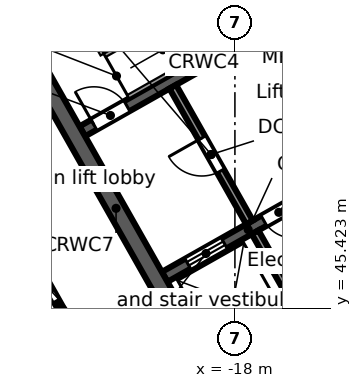
"""IFC4 building model, lengths in metres.
Left out: names, types, materials, properties, quantities, classifications, styles, units other than length and angle.
Written with IfcOpenShell. Run it as: python <this file> out.ifc"""

import sys

from ifc_helpers import new_model, si_unit, direction, frame, frame_2d, origin, place, context, subcontext, project, spatial, rectangle, extrude, element, fill, save


model = new_model("IFC4")
c1 = context("Model", 3, precision=1e-05, world=origin(), true_north=direction((0.0, 1.0)))
c2 = subcontext(c1, "Body", "Model", "MODEL_VIEW")
j1 = project(units=[si_unit("LENGTHUNIT", "METRE"), si_unit("PLANEANGLEUNIT", "RADIAN")], contexts=[c1])
p1 = place(None, origin())
s1 = spatial("IfcSite", under=j1, at=p1, CompositionType="ELEMENT")
p2 = place(p1, origin())
s2 = spatial("IfcBuilding", under=s1, at=p2, CompositionType="ELEMENT")
p3 = place(p2, frame((0.0, 0.0, 211.4)))
s3 = spatial("IfcBuildingStorey", under=s2, at=p3, CompositionType="ELEMENT", Elevation=211.4)
p4 = place(p3, frame((-0.046, 47.974, 0.0), z_axis=(0.0, 0.0, 1.0), x_axis=(-0.870356579543, -0.492421998337, 0.0)))
e1 = element("IfcWall", 1, at=p4, inside=s3, PredefinedType="STANDARD", context=c2, shape_type="SweptSolid", body=[
    extrude(rectangle(XDim=43.754, YDim=0.25, at=frame_2d((21.877, 0.0))), origin(), (0.0, 0.0, 1.0), 3.62),
])
p5 = place(p4, frame((41.061, 0.0, 0.8)))
e2 = element("IfcOpeningElement", 2, at=p5, cuts=e1, PredefinedType="OPENING", context=c2, shape_type="SweptSolid", body=[
    extrude(rectangle(XDim=2.4, YDim=2.2, at=frame_2d((1.2, 1.1))), frame((0.0, 0.135, 0.0), z_axis=(0.0, -1.0, 0.0), x_axis=(1.0, 0.0, 0.0)), (0.0, 0.0, 1.0), 0.27),
])
p6 = place(p4, frame((38.443, 0.0, 0.0)))
e3 = element("IfcOpeningElement", 3, at=p6, cuts=e1, PredefinedType="OPENING", context=c2, shape_type="SweptSolid", body=[
    extrude(rectangle(XDim=1.8, YDim=2.4, at=frame_2d((0.9, 1.2))), frame((0.0, 0.135, 0.0), z_axis=(0.0, -1.0, 0.0), x_axis=(1.0, 0.0, 0.0)), (0.0, 0.0, 1.0), 0.27),
])
p7 = place(p4, frame((35.225, 0.0, 0.8)))
e4 = element("IfcOpeningElement", 4, at=p7, cuts=e1, PredefinedType="OPENING", context=c2, shape_type="SweptSolid", body=[
    extrude(rectangle(XDim=2.4, YDim=2.2, at=frame_2d((1.2, 1.1))), frame((0.0, 0.135, 0.0), z_axis=(0.0, -1.0, 0.0), x_axis=(1.0, 0.0, 0.0)), (0.0, 0.0, 1.0), 0.27),
])
p8 = place(p4, frame((32.307, 0.0, 0.8)))
e5 = element("IfcOpeningElement", 5, at=p8, cuts=e1, PredefinedType="OPENING", context=c2, shape_type="SweptSolid", body=[
    extrude(rectangle(XDim=2.4, YDim=2.2, at=frame_2d((1.2, 1.1))), frame((0.0, 0.135, 0.0), z_axis=(0.0, -1.0, 0.0), x_axis=(1.0, 0.0, 0.0)), (0.0, 0.0, 1.0), 0.27),
])
p9 = place(p4, frame((29.688, 0.0, 0.0)))
e6 = element("IfcOpeningElement", 6, at=p9, cuts=e1, PredefinedType="OPENING", context=c2, shape_type="SweptSolid", body=[
    extrude(rectangle(XDim=1.8, YDim=2.4, at=frame_2d((0.9, 1.2))), frame((0.0, 0.135, 0.0), z_axis=(0.0, -1.0, 0.0), x_axis=(1.0, 0.0, 0.0)), (0.0, 0.0, 1.0), 0.27),
])
p10 = place(p4, frame((26.47, 0.0, 0.8)))
e7 = element("IfcOpeningElement", 7, at=p10, cuts=e1, PredefinedType="OPENING", context=c2, shape_type="SweptSolid", body=[
    extrude(rectangle(XDim=2.4, YDim=2.2, at=frame_2d((1.2, 1.1))), frame((0.0, 0.135, 0.0), z_axis=(0.0, -1.0, 0.0), x_axis=(1.0, 0.0, 0.0)), (0.0, 0.0, 1.0), 0.27),
])
p11 = place(p4, frame((23.552, 0.0, 0.8)))
e8 = element("IfcOpeningElement", 8, at=p11, cuts=e1, PredefinedType="OPENING", context=c2, shape_type="SweptSolid", body=[
    extrude(rectangle(XDim=2.4, YDim=2.2, at=frame_2d((1.2, 1.1))), frame((0.0, 0.135, 0.0), z_axis=(0.0, -1.0, 0.0), x_axis=(1.0, 0.0, 0.0)), (0.0, 0.0, 1.0), 0.27),
])
p12 = place(p4, frame((20.934, 0.0, 0.0)))
e9 = element("IfcOpeningElement", 9, at=p12, cuts=e1, PredefinedType="OPENING", context=c2, shape_type="SweptSolid", body=[
    extrude(rectangle(XDim=1.8, YDim=2.4, at=frame_2d((0.9, 1.2))), frame((0.0, 0.135, 0.0), z_axis=(0.0, -1.0, 0.0), x_axis=(1.0, 0.0, 0.0)), (0.0, 0.0, 1.0), 0.27),
])
p13 = place(p4, frame((17.716, 0.0, 0.8)))
e10 = element("IfcOpeningElement", 10, at=p13, cuts=e1, PredefinedType="OPENING", context=c2, shape_type="SweptSolid", body=[
    extrude(rectangle(XDim=2.4, YDim=2.2, at=frame_2d((1.2, 1.1))), frame((0.0, 0.135, 0.0), z_axis=(0.0, -1.0, 0.0), x_axis=(1.0, 0.0, 0.0)), (0.0, 0.0, 1.0), 0.27),
])
p14 = place(p4, frame((14.798, 0.0, 0.8)))
e11 = element("IfcOpeningElement", 11, at=p14, cuts=e1, PredefinedType="OPENING", context=c2, shape_type="SweptSolid", body=[
    extrude(rectangle(XDim=2.4, YDim=2.2, at=frame_2d((1.2, 1.1))), frame((0.0, 0.135, 0.0), z_axis=(0.0, -1.0, 0.0), x_axis=(1.0, 0.0, 0.0)), (0.0, 0.0, 1.0), 0.27),
])
p15 = place(p4, frame((12.179, 0.0, 0.0)))
e12 = element("IfcOpeningElement", 12, at=p15, cuts=e1, PredefinedType="OPENING", context=c2, shape_type="SweptSolid", body=[
    extrude(rectangle(XDim=1.8, YDim=2.4, at=frame_2d((0.9, 1.2))), frame((0.0, 0.135, 0.0), z_axis=(0.0, -1.0, 0.0), x_axis=(1.0, 0.0, 0.0)), (0.0, 0.0, 1.0), 0.27),
])
p16 = place(p4, frame((8.961, 0.0, 0.8)))
e13 = element("IfcOpeningElement", 13, at=p16, cuts=e1, PredefinedType="OPENING", context=c2, shape_type="SweptSolid", body=[
    extrude(rectangle(XDim=2.4, YDim=2.2, at=frame_2d((1.2, 1.1))), frame((0.0, 0.135, 0.0), z_axis=(0.0, -1.0, 0.0), x_axis=(1.0, 0.0, 0.0)), (0.0, 0.0, 1.0), 0.27),
])
p17 = place(p4, frame((6.043, 0.0, 0.8)))
e14 = element("IfcOpeningElement", 14, at=p17, cuts=e1, PredefinedType="OPENING", context=c2, shape_type="SweptSolid", body=[
    extrude(rectangle(XDim=2.4, YDim=2.2, at=frame_2d((1.2, 1.1))), frame((0.0, 0.135, 0.0), z_axis=(0.0, -1.0, 0.0), x_axis=(1.0, 0.0, 0.0)), (0.0, 0.0, 1.0), 0.27),
])
p18 = place(p4, frame((3.425, 0.0, 0.0)))
e15 = element("IfcOpeningElement", 15, at=p18, cuts=e1, PredefinedType="OPENING", context=c2, shape_type="SweptSolid", body=[
    extrude(rectangle(XDim=1.8, YDim=2.4, at=frame_2d((0.9, 1.2))), frame((0.0, 0.135, 0.0), z_axis=(0.0, -1.0, 0.0), x_axis=(1.0, 0.0, 0.0)), (0.0, 0.0, 1.0), 0.27),
])
p19 = place(p4, frame((0.207, 0.0, 0.8)))
e16 = element("IfcOpeningElement", 16, at=p19, cuts=e1, PredefinedType="OPENING", context=c2, shape_type="SweptSolid", body=[
    extrude(rectangle(XDim=2.4, YDim=2.2, at=frame_2d((1.2, 1.1))), frame((0.0, 0.135, 0.0), z_axis=(0.0, -1.0, 0.0), x_axis=(1.0, 0.0, 0.0)), (0.0, 0.0, 1.0), 0.27),
])
p20 = place(p3, frame((-58.732, 38.771, 0.0), z_axis=(0.0, 0.0, 1.0), x_axis=(0.870354824205, 0.492425100887, 0.0)))
e17 = element("IfcWall", 17, at=p20, inside=s3, PredefinedType="STANDARD", context=c2, shape_type="SweptSolid", body=[
    extrude(rectangle(XDim=64.006, YDim=0.25, at=frame_2d((32.003, 0.0))), origin(), (0.0, 0.0, 1.0), 3.62),
])
p21 = place(p20, frame((61.259, 0.0, 0.8)))
e18 = element("IfcOpeningElement", 18, at=p21, cuts=e17, PredefinedType="OPENING", context=c2, shape_type="SweptSolid", body=[
    extrude(rectangle(XDim=2.4, YDim=2.2, at=frame_2d((1.2, 1.1))), frame((0.0, 0.135, 0.0), z_axis=(0.0, -1.0, 0.0), x_axis=(1.0, 0.0, 0.0)), (0.0, 0.0, 1.0), 0.27),
])
p22 = place(p20, frame((58.216, 0.0, 0.8)))
e19 = element("IfcOpeningElement", 19, at=p22, cuts=e17, PredefinedType="OPENING", context=c2, shape_type="SweptSolid", body=[
    extrude(rectangle(XDim=2.4, YDim=2.2, at=frame_2d((1.2, 1.1))), frame((0.0, 0.135, 0.0), z_axis=(0.0, -1.0, 0.0), x_axis=(1.0, 0.0, 0.0)), (0.0, 0.0, 1.0), 0.27),
])
p23 = place(p20, frame((55.173, 0.0, 0.8)))
e20 = element("IfcOpeningElement", 20, at=p23, cuts=e17, PredefinedType="OPENING", context=c2, shape_type="SweptSolid", body=[
    extrude(rectangle(XDim=2.4, YDim=2.2, at=frame_2d((1.2, 1.1))), frame((0.0, 0.135, 0.0), z_axis=(0.0, -1.0, 0.0), x_axis=(1.0, 0.0, 0.0)), (0.0, 0.0, 1.0), 0.27),
])
p24 = place(p20, frame((52.129, 0.0, 0.8)))
e21 = element("IfcOpeningElement", 21, at=p24, cuts=e17, PredefinedType="OPENING", context=c2, shape_type="SweptSolid", body=[
    extrude(rectangle(XDim=2.4, YDim=2.2, at=frame_2d((1.2, 1.1))), frame((0.0, 0.135, 0.0), z_axis=(0.0, -1.0, 0.0), x_axis=(1.0, 0.0, 0.0)), (0.0, 0.0, 1.0), 0.27),
])
p25 = place(p20, frame((49.086, 0.0, 0.8)))
e22 = element("IfcOpeningElement", 22, at=p25, cuts=e17, PredefinedType="OPENING", context=c2, shape_type="SweptSolid", body=[
    extrude(rectangle(XDim=2.4, YDim=2.2, at=frame_2d((1.2, 1.1))), frame((0.0, 0.135, 0.0), z_axis=(0.0, -1.0, 0.0), x_axis=(1.0, 0.0, 0.0)), (0.0, 0.0, 1.0), 0.27),
])
p26 = place(p20, frame((46.043, 0.0, 0.8)))
e23 = element("IfcOpeningElement", 23, at=p26, cuts=e17, PredefinedType="OPENING", context=c2, shape_type="SweptSolid", body=[
    extrude(rectangle(XDim=2.4, YDim=2.2, at=frame_2d((1.2, 1.1))), frame((0.0, 0.135, 0.0), z_axis=(0.0, -1.0, 0.0), x_axis=(1.0, 0.0, 0.0)), (0.0, 0.0, 1.0), 0.27),
])
p27 = place(p20, frame((43.0, 0.0, 0.8)))
e24 = element("IfcOpeningElement", 24, at=p27, cuts=e17, PredefinedType="OPENING", context=c2, shape_type="SweptSolid", body=[
    extrude(rectangle(XDim=2.4, YDim=2.2, at=frame_2d((1.2, 1.1))), frame((0.0, 0.135, 0.0), z_axis=(0.0, -1.0, 0.0), x_axis=(1.0, 0.0, 0.0)), (0.0, 0.0, 1.0), 0.27),
])
p28 = place(p20, frame((39.956, 0.0, 0.8)))
e25 = element("IfcOpeningElement", 25, at=p28, cuts=e17, PredefinedType="OPENING", context=c2, shape_type="SweptSolid", body=[
    extrude(rectangle(XDim=2.4, YDim=2.2, at=frame_2d((1.2, 1.1))), frame((0.0, 0.135, 0.0), z_axis=(0.0, -1.0, 0.0), x_axis=(1.0, 0.0, 0.0)), (0.0, 0.0, 1.0), 0.27),
])
p29 = place(p20, frame((36.913, 0.0, 0.8)))
e26 = element("IfcOpeningElement", 26, at=p29, cuts=e17, PredefinedType="OPENING", context=c2, shape_type="SweptSolid", body=[
    extrude(rectangle(XDim=2.4, YDim=2.2, at=frame_2d((1.2, 1.1))), frame((0.0, 0.135, 0.0), z_axis=(0.0, -1.0, 0.0), x_axis=(1.0, 0.0, 0.0)), (0.0, 0.0, 1.0), 0.27),
])
p30 = place(p20, frame((33.87, 0.0, 0.8)))
e27 = element("IfcOpeningElement", 27, at=p30, cuts=e17, PredefinedType="OPENING", context=c2, shape_type="SweptSolid", body=[
    extrude(rectangle(XDim=2.4, YDim=2.2, at=frame_2d((1.2, 1.1))), frame((0.0, 0.135, 0.0), z_axis=(0.0, -1.0, 0.0), x_axis=(1.0, 0.0, 0.0)), (0.0, 0.0, 1.0), 0.27),
])
p31 = place(p20, frame((30.826, 0.0, 0.8)))
e28 = element("IfcOpeningElement", 28, at=p31, cuts=e17, PredefinedType="OPENING", context=c2, shape_type="SweptSolid", body=[
    extrude(rectangle(XDim=2.4, YDim=2.2, at=frame_2d((1.2, 1.1))), frame((0.0, 0.135, 0.0), z_axis=(0.0, -1.0, 0.0), x_axis=(1.0, 0.0, 0.0)), (0.0, 0.0, 1.0), 0.27),
])
p32 = place(p20, frame((27.783, 0.0, 0.8)))
e29 = element("IfcOpeningElement", 29, at=p32, cuts=e17, PredefinedType="OPENING", context=c2, shape_type="SweptSolid", body=[
    extrude(rectangle(XDim=2.4, YDim=2.2, at=frame_2d((1.2, 1.1))), frame((0.0, 0.135, 0.0), z_axis=(0.0, -1.0, 0.0), x_axis=(1.0, 0.0, 0.0)), (0.0, 0.0, 1.0), 0.27),
])
p33 = place(p20, frame((24.74, 0.0, 0.8)))
e30 = element("IfcOpeningElement", 30, at=p33, cuts=e17, PredefinedType="OPENING", context=c2, shape_type="SweptSolid", body=[
    extrude(rectangle(XDim=2.4, YDim=2.2, at=frame_2d((1.2, 1.1))), frame((0.0, 0.135, 0.0), z_axis=(0.0, -1.0, 0.0), x_axis=(1.0, 0.0, 0.0)), (0.0, 0.0, 1.0), 0.27),
])
p34 = place(p20, frame((21.696, 0.0, 0.8)))
e31 = element("IfcOpeningElement", 31, at=p34, cuts=e17, PredefinedType="OPENING", context=c2, shape_type="SweptSolid", body=[
    extrude(rectangle(XDim=2.4, YDim=2.2, at=frame_2d((1.2, 1.1))), frame((0.0, 0.135, 0.0), z_axis=(0.0, -1.0, 0.0), x_axis=(1.0, 0.0, 0.0)), (0.0, 0.0, 1.0), 0.27),
])
p35 = place(p20, frame((18.653, 0.0, 0.8)))
e32 = element("IfcOpeningElement", 32, at=p35, cuts=e17, PredefinedType="OPENING", context=c2, shape_type="SweptSolid", body=[
    extrude(rectangle(XDim=2.4, YDim=2.2, at=frame_2d((1.2, 1.1))), frame((0.0, 0.135, 0.0), z_axis=(0.0, -1.0, 0.0), x_axis=(1.0, 0.0, 0.0)), (0.0, 0.0, 1.0), 0.27),
])
p36 = place(p20, frame((15.61, 0.0, 0.8)))
e33 = element("IfcOpeningElement", 33, at=p36, cuts=e17, PredefinedType="OPENING", context=c2, shape_type="SweptSolid", body=[
    extrude(rectangle(XDim=2.4, YDim=2.2, at=frame_2d((1.2, 1.1))), frame((0.0, 0.135, 0.0), z_axis=(0.0, -1.0, 0.0), x_axis=(1.0, 0.0, 0.0)), (0.0, 0.0, 1.0), 0.27),
])
p37 = place(p20, frame((12.567, 0.0, 0.8)))
e34 = element("IfcOpeningElement", 34, at=p37, cuts=e17, PredefinedType="OPENING", context=c2, shape_type="SweptSolid", body=[
    extrude(rectangle(XDim=2.4, YDim=2.2, at=frame_2d((1.2, 1.1))), frame((0.0, 0.135, 0.0), z_axis=(0.0, -1.0, 0.0), x_axis=(1.0, 0.0, 0.0)), (0.0, 0.0, 1.0), 0.27),
])
p38 = place(p20, frame((9.523, 0.0, 0.8)))
e35 = element("IfcOpeningElement", 35, at=p38, cuts=e17, PredefinedType="OPENING", context=c2, shape_type="SweptSolid", body=[
    extrude(rectangle(XDim=2.4, YDim=2.2, at=frame_2d((1.2, 1.1))), frame((0.0, 0.135, 0.0), z_axis=(0.0, -1.0, 0.0), x_axis=(1.0, 0.0, 0.0)), (0.0, 0.0, 1.0), 0.27),
])
p39 = place(p20, frame((6.48, 0.0, 0.8)))
e36 = element("IfcOpeningElement", 36, at=p39, cuts=e17, PredefinedType="OPENING", context=c2, shape_type="SweptSolid", body=[
    extrude(rectangle(XDim=2.4, YDim=2.2, at=frame_2d((1.2, 1.1))), frame((0.0, 0.135, 0.0), z_axis=(0.0, -1.0, 0.0), x_axis=(1.0, 0.0, 0.0)), (0.0, 0.0, 1.0), 0.27),
])
p40 = place(p20, frame((3.437, 0.0, 0.8)))
e37 = element("IfcOpeningElement", 37, at=p40, cuts=e17, PredefinedType="OPENING", context=c2, shape_type="SweptSolid", body=[
    extrude(rectangle(XDim=2.4, YDim=2.2, at=frame_2d((1.2, 1.1))), frame((0.0, 0.135, 0.0), z_axis=(0.0, -1.0, 0.0), x_axis=(1.0, 0.0, 0.0)), (0.0, 0.0, 1.0), 0.27),
])
p41 = place(p20, frame((0.393, 0.0, 0.8)))
e38 = element("IfcOpeningElement", 38, at=p41, cuts=e17, PredefinedType="OPENING", context=c2, shape_type="SweptSolid", body=[
    extrude(rectangle(XDim=2.4, YDim=2.2, at=frame_2d((1.2, 1.1))), frame((0.0, 0.135, 0.0), z_axis=(0.0, -1.0, 0.0), x_axis=(1.0, 0.0, 0.0)), (0.0, 0.0, 1.0), 0.27),
])
p42 = place(p3, frame((-17.988, 42.039, 0.0), z_axis=(0.0, 0.0, 1.0), x_axis=(0.870360574057, 0.492414937962, 0.0)))
e39 = element("IfcWall", 39, at=p42, inside=s3, PredefinedType="SOLIDWALL", context=c2, shape_type="SweptSolid", body=[
    extrude(rectangle(XDim=15.0, YDim=0.45, at=frame_2d((7.5, 0.0))), origin(), (0.0, 0.0, 1.0), 3.62),
])
p43 = place(p42, frame((6.1, 0.0, 0.0)))
e40 = element("IfcOpeningElement", 40, at=p43, cuts=e39, PredefinedType="OPENING", context=c2, shape_type="SweptSolid", body=[
    extrude(rectangle(XDim=1.2, YDim=2.1, at=frame_2d((0.6, 1.05))), frame((0.0, 0.235, 0.0), z_axis=(0.0, -1.0, 0.0), x_axis=(1.0, 0.0, 0.0)), (0.0, 0.0, 1.0), 0.47),
])
p44 = place(p3, frame((-19.849, 46.242, 0.0), z_axis=(0.0, 0.0, 1.0), x_axis=(0.870347559728, 0.492437940532, 0.0)))
e41 = element("IfcWall", 41, at=p44, inside=s3, PredefinedType="SOLIDWALL", context=c2, shape_type="SweptSolid", body=[
    extrude(rectangle(XDim=5.05, YDim=0.3, at=frame_2d((2.525, 0.0))), origin(), (0.0, 0.0, 1.0), 3.62),
])
p45 = place(p44, frame((0.7, 0.0, 0.0)))
e42 = element("IfcOpeningElement", 42, at=p45, cuts=e41, PredefinedType="OPENING", context=c2, shape_type="SweptSolid", body=[
    extrude(rectangle(XDim=1.1, YDim=2.1, at=frame_2d((0.55, 1.05))), frame((0.0, 0.16, 0.0), z_axis=(0.0, -1.0, 0.0), x_axis=(1.0, 0.0, 0.0)), (0.0, 0.0, 1.0), 0.32),
])
p46 = place(p44, frame((3.0, 0.0, 0.0)))
e43 = element("IfcOpeningElement", 43, at=p46, cuts=e41, PredefinedType="OPENING", context=c2, shape_type="SweptSolid", body=[
    extrude(rectangle(XDim=0.9, YDim=2.1, at=frame_2d((0.45, 1.05))), frame((0.0, 0.16, 0.0), z_axis=(0.0, -1.0, 0.0), x_axis=(1.0, 0.0, 0.0)), (0.0, 0.0, 1.0), 0.32),
])
p47 = place(p3, frame((-22.015, 50.072, 0.0), z_axis=(0.0, 0.0, 1.0), x_axis=(0.870354900257, 0.492424966466, 0.0)))
e44 = element("IfcWall", 44, at=p47, inside=s3, PredefinedType="SOLIDWALL", context=c2, shape_type="SweptSolid", body=[
    extrude(rectangle(XDim=7.35, YDim=0.3, at=frame_2d((3.675, 0.0))), origin(), (0.0, 0.0, 1.0), 3.62),
])
p48 = place(p47, frame((0.35, 0.0, 0.0)))
e45 = element("IfcOpeningElement", 45, at=p48, cuts=e44, PredefinedType="OPENING", context=c2, shape_type="SweptSolid", body=[
    extrude(rectangle(XDim=1.0, YDim=2.1, at=frame_2d((0.5, 1.05))), frame((0.0, 0.16, 0.0), z_axis=(0.0, -1.0, 0.0), x_axis=(1.0, 0.0, 0.0)), (0.0, 0.0, 1.0), 0.32),
])
p49 = place(p3, frame((-24.353, 53.747, 0.0), z_axis=(0.0, 0.0, 1.0), x_axis=(0.492435496286, -0.870348942665, 0.0)))
e46 = element("IfcWall", 46, at=p49, inside=s3, PredefinedType="SOLIDWALL", context=c2, shape_type="SweptSolid", body=[
    extrude(rectangle(XDim=13.1, YDim=0.45, at=frame_2d((6.55, 0.0))), origin(), (0.0, 0.0, 1.0), 3.62),
])
p50 = place(p3, frame((-17.469, 47.417, 0.0), z_axis=(0.0, 0.0, 1.0), x_axis=(0.492453686477, -0.870338650569, 0.0)))
e47 = element("IfcWall", 47, at=p50, inside=s3, PredefinedType="SOLIDWALL", context=c2, shape_type="SweptSolid", body=[
    extrude(rectangle(XDim=4.2, YDim=0.2, at=frame_2d((2.1, 0.0))), origin(), (0.0, 0.0, 1.0), 3.62),
])
p51 = place(p3, frame((-19.635, 51.246, 0.0), z_axis=(0.0, 0.0, 1.0), x_axis=(0.492408451753, -0.87036424366, 0.0)))
e48 = element("IfcWall", 48, at=p51, inside=s3, PredefinedType="PARTITIONING", context=c2, shape_type="SweptSolid", body=[
    extrude(rectangle(XDim=4.1, YDim=0.2, at=frame_2d((2.05, 0.0))), origin(), (0.0, 0.0, 1.0), 3.62),
])
p52 = place(p51, frame((1.55, 0.0, 0.0)))
e49 = element("IfcOpeningElement", 49, at=p52, cuts=e48, PredefinedType="OPENING", context=c2, shape_type="SweptSolid", body=[
    extrude(rectangle(XDim=1.0, YDim=2.1, at=frame_2d((0.5, 1.05))), frame((0.0, 0.11, 0.0), z_axis=(0.0, -1.0, 0.0), x_axis=(1.0, 0.0, 0.0)), (0.0, 0.0, 1.0), 0.22),
])
p53 = place(p3, frame((-23.361, 46.783, 0.0), z_axis=(0.0, 0.0, 1.0), x_axis=(0.492467412326, -0.870330884088, 0.0)))
e50 = element("IfcWall", 50, at=p53, inside=s3, PredefinedType="PARTITIONING", context=c2, shape_type="SweptSolid", body=[
    extrude(rectangle(XDim=2.0, YDim=0.15, at=frame_2d((1.0, 0.0))), origin(), (0.0, 0.0, 1.0), 2.892),
])
p54 = place(p53, frame((0.45, 0.0, 0.0)))
e51 = element("IfcOpeningElement", 51, at=p54, cuts=e50, PredefinedType="OPENING", context=c2, shape_type="SweptSolid", body=[
    extrude(rectangle(XDim=0.9, YDim=2.1, at=frame_2d((0.45, 1.05))), frame((0.0, 0.085, 0.0), z_axis=(0.0, -1.0, 0.0), x_axis=(1.0, 0.0, 0.0)), (0.0, 0.0, 1.0), 0.17),
])
p55 = place(p45, origin())
e52 = element("IfcDoor", 52, at=p55, inside=s3, OperationType="DOUBLE_DOOR_SLIDING", PredefinedType="DOOR", context=c2, shape_type="SweptSolid", body=[
    extrude(rectangle(XDim=1.1, YDim=2.1, at=frame_2d((0.55, 1.05))), frame((0.0, 0.025, 0.0), z_axis=(0.0, -1.0, 0.0), x_axis=(1.0, 0.0, 0.0)), (0.0, 0.0, 1.0), 0.05),
])
fill(e42, e52)
p56 = place(p48, origin())
e53 = element("IfcDoor", 53, at=p56, inside=s3, OperationType="SINGLE_SWING_LEFT", PredefinedType="DOOR", context=c2, shape_type="SweptSolid", body=[
    extrude(rectangle(XDim=1.0, YDim=2.1, at=frame_2d((0.5, 1.05))), frame((0.0, 0.025, 0.0), z_axis=(0.0, -1.0, 0.0), x_axis=(1.0, 0.0, 0.0)), (0.0, 0.0, 1.0), 0.05),
])
fill(e45, e53)
p57 = place(p52, frame((1.0, 0.0, 0.0), z_axis=(0.0, 0.0, 1.0), x_axis=(-1.0, 0.0, 0.0)))
e54 = element("IfcDoor", 54, at=p57, inside=s3, OperationType="SINGLE_SWING_RIGHT", PredefinedType="DOOR", context=c2, shape_type="SweptSolid", body=[
    extrude(rectangle(XDim=1.0, YDim=2.1, at=frame_2d((0.5, 1.05))), frame((0.0, 0.025, 0.0), z_axis=(0.0, -1.0, 0.0), x_axis=(1.0, 0.0, 0.0)), (0.0, 0.0, 1.0), 0.05),
])
fill(e49, e54)
p58 = place(p46, frame((0.9, 0.0, 0.0), z_axis=(0.0, 0.0, 1.0), x_axis=(-1.0, 0.0, 0.0)))
e55 = element("IfcDoor", 55, at=p58, inside=s3, OperationType="SINGLE_SWING_LEFT", PredefinedType="DOOR", context=c2, shape_type="SweptSolid", body=[
    extrude(rectangle(XDim=0.9, YDim=2.1, at=frame_2d((0.45, 1.05))), frame((0.0, 0.025, 0.0), z_axis=(0.0, -1.0, 0.0), x_axis=(1.0, 0.0, 0.0)), (0.0, 0.0, 1.0), 0.05),
])
fill(e43, e55)
p59 = place(p54, frame((0.9, 0.0, 0.0), z_axis=(0.0, 0.0, 1.0), x_axis=(-1.0, 0.0, 0.0)))
e56 = element("IfcDoor", 56, at=p59, inside=s3, OperationType="SINGLE_SWING_RIGHT", PredefinedType="DOOR", context=c2, shape_type="SweptSolid", body=[
    extrude(rectangle(XDim=0.9, YDim=2.1, at=frame_2d((0.45, 1.05))), frame((0.0, 0.025, 0.0), z_axis=(0.0, -1.0, 0.0), x_axis=(1.0, 0.0, 0.0)), (0.0, 0.0, 1.0), 0.05),
])
fill(e51, e56)
save(model, sys.argv[1])
